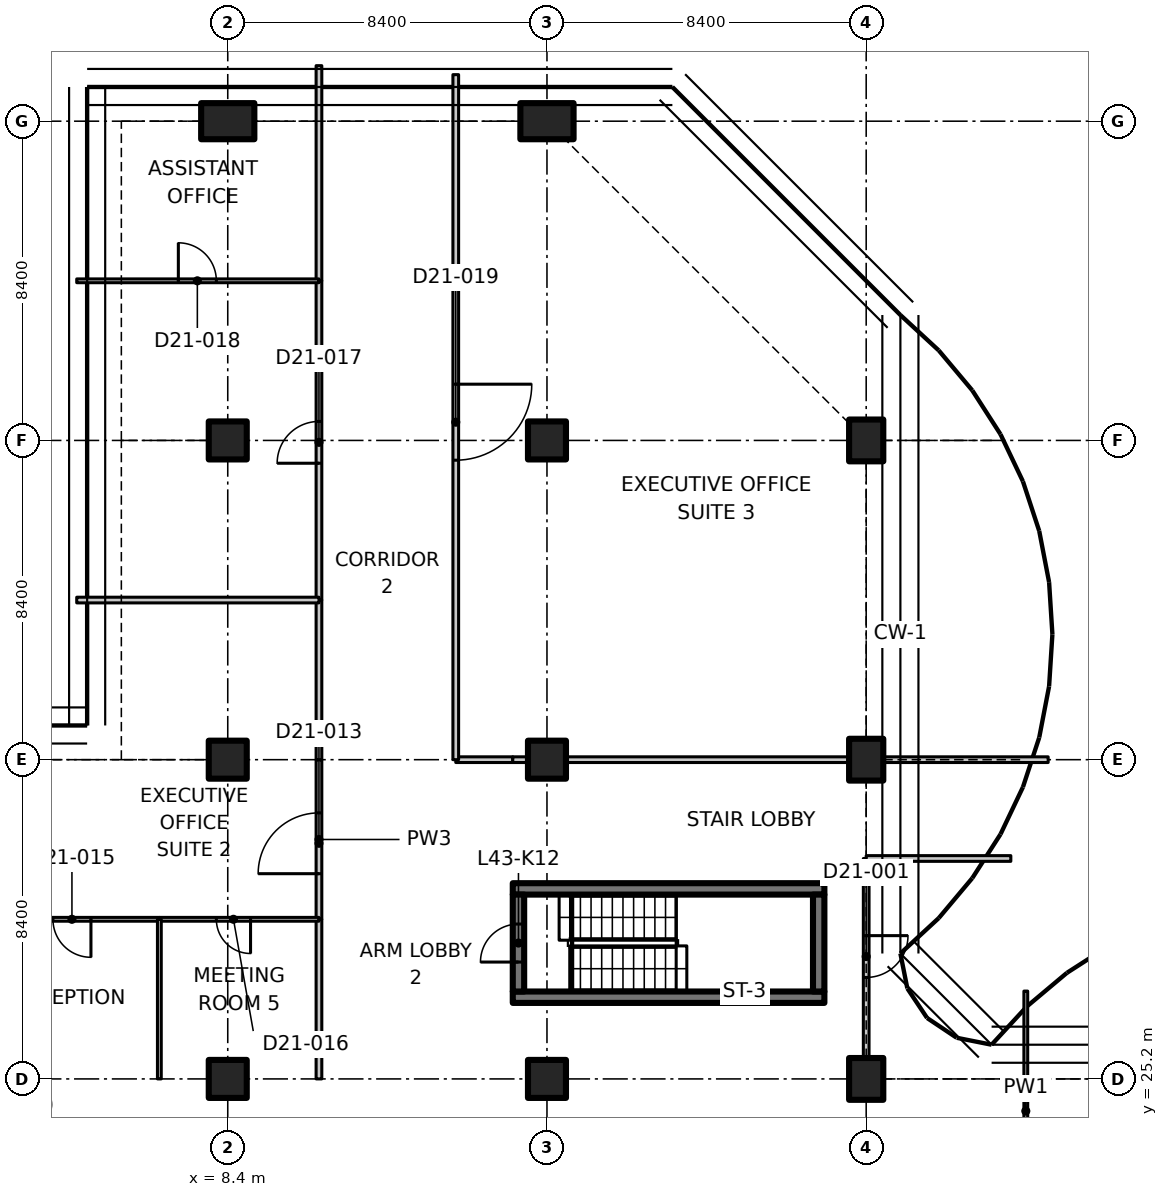
"""IFC4 building model, lengths in metres.
Left out: names, types, materials, properties, quantities, classifications, styles, units other than length and angle.
Written with IfcOpenShell. Run it as: python <this file> out.ifc"""

import sys

from ifc_helpers import new_model, si_unit, direction, frame, frame_2d, origin, origin_2d, place, context, subcontext, project, spatial, polyline, rectangle, outline, extrude, element, fill, save


model = new_model("IFC4")
c1 = context("Model", 3, precision=1e-05, world=origin(), true_north=direction((0.0, 1.0)))
c2 = subcontext(c1, "Body", "Model", "MODEL_VIEW")
j1 = project(units=[si_unit("LENGTHUNIT", "METRE"), si_unit("PLANEANGLEUNIT", "RADIAN")], contexts=[c1])
p1 = place(None, origin())
s1 = spatial("IfcSite", under=j1, at=p1, CompositionType="ELEMENT")
p2 = place(p1, origin())
s2 = spatial("IfcBuilding", under=s1, at=p2, CompositionType="ELEMENT")
p3 = place(p2, frame((0.0, 0.0, 174.0)))
s3 = spatial("IfcBuildingStorey", under=s2, at=p3, CompositionType="ELEMENT", Elevation=174.0)
for number, where, z_axis, x_axis in (
    (1, (8.4, 25.2, 0.0), (0.0, 0.0, 1.0), (1.0, 0.0, 0.0)),
    (2, (8.4, 33.6, 0.0), (0.0, 0.0, 1.0), (1.0, 0.0, 0.0)),
    (3, (8.4, 42.0, 0.0), (0.0, 0.0, 1.0), (1.0, 0.0, 0.0)),
):
    element("IfcColumn", number, at=place(p3, frame(where, z_axis=z_axis, x_axis=x_axis)), inside=s3, PredefinedType="COLUMN", context=c2, shape_type="SweptSolid", body=[
        extrude(rectangle(XDim=1.0, YDim=1.0, at=origin_2d()), origin(), (0.0, 0.0, 1.0), 3.35),
    ])
p4 = place(p3, frame((8.4, 50.4, 0.0), z_axis=(0.0, 0.0, 1.0), x_axis=(0.0, 1.0, 0.0)))
e4 = element("IfcColumn", 4, at=p4, inside=s3, PredefinedType="COLUMN", context=c2, shape_type="SweptSolid", body=[
    extrude(rectangle(XDim=0.95, YDim=1.4, at=origin_2d()), origin(), (0.0, 0.0, 1.0), 3.35),
])
for number, where, z_axis, x_axis in (
    (5, (16.8, 25.2, 0.0), (0.0, 0.0, 1.0), (1.0, 0.0, 0.0)),
    (6, (16.8, 33.6, 0.0), (0.0, 0.0, 1.0), (1.0, 0.0, 0.0)),
    (7, (16.8, 42.0, 0.0), (0.0, 0.0, 1.0), (1.0, 0.0, 0.0)),
):
    element("IfcColumn", number, at=place(p3, frame(where, z_axis=z_axis, x_axis=x_axis)), inside=s3, PredefinedType="COLUMN", context=c2, shape_type="SweptSolid", body=[
        extrude(rectangle(XDim=1.0, YDim=1.0, at=origin_2d()), origin(), (0.0, 0.0, 1.0), 3.35),
    ])
p5 = place(p3, frame((16.8, 50.4, 0.0), z_axis=(0.0, 0.0, 1.0), x_axis=(0.0, 1.0, 0.0)))
e8 = element("IfcColumn", 8, at=p5, inside=s3, PredefinedType="COLUMN", context=c2, shape_type="SweptSolid", body=[
    extrude(rectangle(XDim=0.95, YDim=1.4, at=origin_2d()), origin(), (0.0, 0.0, 1.0), 3.35),
])
for number, where, z_axis, x_axis in (
    (9, (25.2, 25.2, 0.0), (0.0, 0.0, 1.0), (1.0, 0.0, 0.0)),
    (10, (25.2, 33.6, 0.0), (0.0, 0.0, 1.0), (1.0, 0.0, 0.0)),
    (11, (25.2, 42.0, 0.0), (0.0, 0.0, 1.0), (1.0, 0.0, 0.0)),
):
    element("IfcColumn", number, at=place(p3, frame(where, z_axis=z_axis, x_axis=x_axis)), inside=s3, PredefinedType="COLUMN", context=c2, shape_type="SweptSolid", body=[
        extrude(rectangle(XDim=0.9, YDim=1.1, at=origin_2d()), origin(), (0.0, 0.0, 1.0), 3.35),
    ])
for number, where, z_axis, x_axis in (
    (12, (15.9, 27.35, 0.0), (0.0, 0.0, 1.0), (1.0, 0.0, 0.0)),
    (13, (15.9, 30.2, 0.0), (0.0, 0.0, 1.0), (1.0, 0.0, 0.0)),
):
    element("IfcWall", number, at=place(p3, frame(where, z_axis=z_axis, x_axis=x_axis)), inside=s3, PredefinedType="SHEAR", context=c2, shape_type="SweptSolid", body=[
        extrude(rectangle(XDim=8.2, YDim=0.3, at=frame_2d((4.1, 0.0))), origin(), (0.0, 0.0, 1.0), 3.35),
    ])
p6 = place(p3, frame((16.05, 27.5, 0.0), z_axis=(0.0, 0.0, 1.0), x_axis=(0.0, 1.0, 0.0)))
e14 = element("IfcWall", 14, at=p6, inside=s3, PredefinedType="SHEAR", context=c2, shape_type="SweptSolid", body=[
    extrude(rectangle(XDim=2.55, YDim=0.3, at=frame_2d((1.275, 0.0))), origin(), (0.0, 0.0, 1.0), 3.35),
])
p7 = place(p6, frame((0.775, 0.0, 0.0)))
e15 = element("IfcOpeningElement", 15, at=p7, cuts=e14, PredefinedType="OPENING", context=c2, shape_type="SweptSolid", body=[
    extrude(rectangle(XDim=1.0, YDim=2.1, at=frame_2d((0.5, 1.05))), frame((0.0, 0.16, 0.0), z_axis=(0.0, -1.0, 0.0), x_axis=(1.0, 0.0, 0.0)), (0.0, 0.0, 1.0), 0.32),
])
p8 = place(p3, frame((23.95, 27.5, 0.0), z_axis=(0.0, 0.0, 1.0), x_axis=(0.0, 1.0, 0.0)))
e16 = element("IfcWall", 16, at=p8, inside=s3, PredefinedType="SHEAR", context=c2, shape_type="SweptSolid", body=[
    extrude(rectangle(XDim=2.55, YDim=0.3, at=frame_2d((1.275, 0.0))), origin(), (0.0, 0.0, 1.0), 3.35),
])
p9 = place(p3, frame((29.4, 27.511, 0.0), z_axis=(0.0, 0.0, 1.0), x_axis=(0.0, -1.0, 0.0)))
e17 = element("IfcWall", 17, at=p9, inside=s3, PredefinedType="PARTITIONING", context=c2, shape_type="SweptSolid", body=[
    extrude(outline(polyline([(0.0, 0.0), (6.311, 0.0), (6.311, 3.33), (2.761, 3.33), (2.759, 2.98), (1.863, 2.98), (1.861, 3.33), (0.236, 3.33), (0.0, 3.33), (0.0, 0.0)])), frame((0.0, 0.05, 0.0), z_axis=(0.0, -1.0, 0.0), x_axis=(1.0, 0.0, 0.0)), (0.0, 0.0, 1.0), 0.1),
])
p10 = place(p3, frame((25.2, 31.0, 0.0), z_axis=(0.0, 0.0, 1.0), x_axis=(0.0, -1.0, 0.0)))
e18 = element("IfcWall", 18, at=p10, inside=s3, PredefinedType="PARTITIONING", context=c2, shape_type="SweptSolid", body=[
    extrude(outline(polyline([(0.0, 0.0), (5.23, 0.0), (5.23, 2.98), (0.0, 2.98), (0.0, 0.0)])), frame((0.0, 0.075, 0.0), z_axis=(0.0, -1.0, 0.0), x_axis=(1.0, 0.0, 0.0)), (0.0, 0.0, 1.0), 0.15),
])
p11 = place(p10, frame((2.03, 0.0, 0.0)))
e19 = element("IfcOpeningElement", 19, at=p11, cuts=e18, PredefinedType="OPENING", context=c2, shape_type="SweptSolid", body=[
    extrude(rectangle(XDim=1.1, YDim=2.1, at=frame_2d((0.55, 1.05))), frame((0.0, 0.085, 0.0), z_axis=(0.0, -1.0, 0.0), x_axis=(1.0, 0.0, 0.0)), (0.0, 0.0, 1.0), 0.17),
])
p12 = place(p3, frame((25.2, 31.0, 0.0), z_axis=(0.0, 0.0, 1.0), x_axis=(1.0, 0.0, 0.0)))
e20 = element("IfcWall", 20, at=p12, inside=s3, PredefinedType="PARTITIONING", context=c2, shape_type="SweptSolid", body=[
    extrude(rectangle(XDim=3.806, YDim=0.15, at=frame_2d((1.903, 0.0))), origin(), (0.0, 0.0, 1.0), 2.98),
])
p13 = place(p3, frame((10.8, 29.4, 0.0), z_axis=(0.0, 0.0, 1.0), x_axis=(0.0, 1.0, 0.0)))
e21 = element("IfcWall", 21, at=p13, inside=s3, PredefinedType="PARTITIONING", context=c2, shape_type="SweptSolid", body=[
    extrude(rectangle(XDim=4.2, YDim=0.15, at=frame_2d((2.1, 0.0))), origin(), (0.0, 0.0, 1.0), 3.33),
])
p14 = place(p13, frame((1.2, 0.0, 0.0)))
e22 = element("IfcOpeningElement", 22, at=p14, cuts=e21, PredefinedType="OPENING", context=c2, shape_type="SweptSolid", body=[
    extrude(rectangle(XDim=1.6, YDim=2.1, at=frame_2d((0.8, 1.05))), frame((0.0, 0.085, 0.0), z_axis=(0.0, -1.0, 0.0), x_axis=(1.0, 0.0, 0.0)), (0.0, 0.0, 1.0), 0.17),
])
p15 = place(p3, frame((10.8, 25.2, 0.0), z_axis=(0.0, 0.0, 1.0), x_axis=(0.0, 1.0, 0.0)))
e23 = element("IfcWall", 23, at=p15, inside=s3, PredefinedType="PARTITIONING", context=c2, shape_type="SweptSolid", body=[
    extrude(rectangle(XDim=4.2, YDim=0.15, at=frame_2d((2.1, 0.0))), origin(), (0.0, 0.0, 1.0), 3.33),
])
p16 = place(p3, frame((14.4, 33.6, 0.0), z_axis=(0.0, 0.0, 1.0), x_axis=(1.0, 0.0, 0.0)))
e24 = element("IfcWall", 24, at=p16, inside=s3, PredefinedType="PARTITIONING", context=c2, shape_type="SweptSolid", body=[
    extrude(rectangle(XDim=1.5, YDim=0.15, at=frame_2d((0.75, 0.0))), origin(), (0.0, 0.0, 1.0), 3.33),
])
p17 = place(p3, frame((15.9, 33.6, 0.0), z_axis=(0.0, 0.0, 1.0), x_axis=(1.0, 0.0, 0.0)))
e25 = element("IfcWall", 25, at=p17, inside=s3, PredefinedType="PARTITIONING", context=c2, shape_type="SweptSolid", body=[
    extrude(rectangle(XDim=0.38, YDim=0.15, at=frame_2d((0.19, 0.0))), origin(), (0.0, 0.0, 1.0), 3.33),
])
p18 = place(p3, frame((17.32, 33.6, 0.0), z_axis=(0.0, 0.0, 1.0), x_axis=(1.0, 0.0, 0.0)))
e26 = element("IfcWall", 26, at=p18, inside=s3, PredefinedType="PARTITIONING", context=c2, shape_type="SweptSolid", body=[
    extrude(rectangle(XDim=7.41, YDim=0.15, at=frame_2d((3.705, 0.0))), origin(), (0.0, 0.0, 1.0), 3.33),
])
p19 = place(p3, frame((25.67, 33.6, 0.0), z_axis=(0.0, 0.0, 1.0), x_axis=(1.0, 0.0, 0.0)))
e27 = element("IfcWall", 27, at=p19, inside=s3, PredefinedType="PARTITIONING", context=c2, shape_type="SweptSolid", body=[
    extrude(rectangle(XDim=4.318, YDim=0.15, at=frame_2d((2.159, 0.0))), origin(), (0.0, 0.0, 1.0), 2.98),
])
p20 = place(p3, frame((10.8, 33.6, 0.0), z_axis=(0.0, 0.0, 1.0), x_axis=(0.0, 1.0, 0.0)))
e28 = element("IfcWall", 28, at=p20, inside=s3, PredefinedType="PARTITIONING", context=c2, shape_type="SweptSolid", body=[
    extrude(rectangle(XDim=4.2, YDim=0.15, at=frame_2d((2.1, 0.0))), origin(), (0.0, 0.0, 1.0), 3.33),
])
p21 = place(p3, frame((10.8, 37.8, 0.0), z_axis=(0.0, 0.0, 1.0), x_axis=(0.0, 1.0, 0.0)))
e29 = element("IfcWall", 29, at=p21, inside=s3, PredefinedType="PARTITIONING", context=c2, shape_type="SweptSolid", body=[
    extrude(rectangle(XDim=8.4, YDim=0.15, at=frame_2d((4.2, 0.0))), origin(), (0.0, 0.0, 1.0), 3.33),
])
p22 = place(p21, frame((3.6, 0.0, 0.0)))
e30 = element("IfcOpeningElement", 30, at=p22, cuts=e29, PredefinedType="OPENING", context=c2, shape_type="SweptSolid", body=[
    extrude(rectangle(XDim=1.1, YDim=2.1, at=frame_2d((0.55, 1.05))), frame((0.0, 0.085, 0.0), z_axis=(0.0, -1.0, 0.0), x_axis=(1.0, 0.0, 0.0)), (0.0, 0.0, 1.0), 0.17),
])
p23 = place(p3, frame((10.8, 46.2, 0.0), z_axis=(0.0, 0.0, 1.0), x_axis=(0.0, 1.0, 0.0)))
e31 = element("IfcWall", 31, at=p23, inside=s3, PredefinedType="PARTITIONING", context=c2, shape_type="SweptSolid", body=[
    extrude(outline(polyline([(0.0, 0.0), (5.661, 0.0), (5.661, 3.33), (5.28, 3.33), (4.65, 3.33), (4.648, 2.98), (3.752, 2.98), (3.75, 3.33), (0.0, 3.33), (0.0, 0.0)])), frame((0.0, 0.075, 0.0), z_axis=(0.0, -1.0, 0.0), x_axis=(1.0, 0.0, 0.0)), (0.0, 0.0, 1.0), 0.15),
])
p24 = place(p3, frame((14.4, 51.625, 0.0), z_axis=(0.0, 0.0, 1.0), x_axis=(0.0, -1.0, 0.0)))
e32 = element("IfcWall", 32, at=p24, inside=s3, PredefinedType="PARTITIONING", context=c2, shape_type="SweptSolid", body=[
    extrude(outline(polyline([(0.0, 0.0), (18.025, 0.0), (18.025, 3.33), (1.675, 3.33), (1.673, 2.98), (0.777, 2.98), (0.775, 3.33), (0.145, 3.33), (0.0, 3.33), (0.0, 0.0)])), frame((0.0, 0.075, 0.0), z_axis=(0.0, -1.0, 0.0), x_axis=(1.0, 0.0, 0.0)), (0.0, 0.0, 1.0), 0.15),
])
p25 = place(p24, frame((8.145, 0.0, 0.0)))
e33 = element("IfcOpeningElement", 33, at=p25, cuts=e32, PredefinedType="OPENING", context=c2, shape_type="SweptSolid", body=[
    extrude(rectangle(XDim=2.0, YDim=2.4, at=frame_2d((1.0, 1.2))), frame((0.0, 0.085, 0.0), z_axis=(0.0, -1.0, 0.0), x_axis=(1.0, 0.0, 0.0)), (0.0, 0.0, 1.0), 0.17),
])
p26 = place(p3, frame((6.6, 29.4, 0.0), z_axis=(0.0, 0.0, 1.0), x_axis=(-1.0, 0.0, 0.0)))
e34 = element("IfcWall", 34, at=p26, inside=s3, PredefinedType="PARTITIONING", context=c2, shape_type="SweptSolid", body=[
    extrude(rectangle(XDim=4.8, YDim=0.1, at=frame_2d((2.4, 0.0))), origin(), (0.0, 0.0, 1.0), 3.33),
])
p27 = place(p26, frame((1.8, 0.0, 0.0)))
e35 = element("IfcOpeningElement", 35, at=p27, cuts=e34, PredefinedType="OPENING", context=c2, shape_type="SweptSolid", body=[
    extrude(rectangle(XDim=1.0, YDim=2.1, at=frame_2d((0.5, 1.05))), frame((0.0, 0.06, 0.0), z_axis=(0.0, -1.0, 0.0), x_axis=(1.0, 0.0, 0.0)), (0.0, 0.0, 1.0), 0.12),
])
p28 = place(p3, frame((10.8, 29.4, 0.0), z_axis=(0.0, 0.0, 1.0), x_axis=(-1.0, 0.0, 0.0)))
e36 = element("IfcWall", 36, at=p28, inside=s3, PredefinedType="PARTITIONING", context=c2, shape_type="SweptSolid", body=[
    extrude(rectangle(XDim=4.2, YDim=0.1, at=frame_2d((2.1, 0.0))), origin(), (0.0, 0.0, 1.0), 3.33),
])
p29 = place(p28, frame((1.8, 0.0, 0.0)))
e37 = element("IfcOpeningElement", 37, at=p29, cuts=e36, PredefinedType="OPENING", context=c2, shape_type="SweptSolid", body=[
    extrude(rectangle(XDim=0.9, YDim=2.1, at=frame_2d((0.45, 1.05))), frame((0.0, 0.06, 0.0), z_axis=(0.0, -1.0, 0.0), x_axis=(1.0, 0.0, 0.0)), (0.0, 0.0, 1.0), 0.12),
])
p30 = place(p3, frame((4.426, 37.8, 0.0), z_axis=(0.0, 0.0, 1.0), x_axis=(1.0, 0.0, 0.0)))
e38 = element("IfcWall", 38, at=p30, inside=s3, PredefinedType="PARTITIONING", context=c2, shape_type="SweptSolid", body=[
    extrude(outline(polyline([(0.0, 0.0), (6.374, 0.0), (6.374, 3.33), (1.624, 3.33), (1.622, 2.98), (0.726, 2.98), (0.724, 3.33), (0.074, 3.33), (0.0, 3.33), (0.0, 0.0)])), frame((0.0, 0.075, 0.0), z_axis=(0.0, -1.0, 0.0), x_axis=(1.0, 0.0, 0.0)), (0.0, 0.0, 1.0), 0.15),
])
p31 = place(p3, frame((6.6, 29.4, 0.0), z_axis=(0.0, 0.0, 1.0), x_axis=(0.0, -1.0, 0.0)))
e39 = element("IfcWall", 39, at=p31, inside=s3, PredefinedType="PARTITIONING", context=c2, shape_type="SweptSolid", body=[
    extrude(rectangle(XDim=4.2, YDim=0.1, at=frame_2d((2.1, 0.0))), origin(), (0.0, 0.0, 1.0), 3.33),
])
p32 = place(p3, frame((4.426, 46.2, 0.0), z_axis=(0.0, 0.0, 1.0), x_axis=(1.0, 0.0, 0.0)))
e40 = element("IfcWall", 40, at=p32, inside=s3, PredefinedType="PARTITIONING", context=c2, shape_type="SweptSolid", body=[
    extrude(outline(polyline([(0.0, 0.0), (6.374, 0.0), (6.374, 3.33), (1.624, 3.33), (1.622, 2.98), (0.726, 2.98), (0.724, 3.33), (0.074, 3.33), (0.0, 3.33), (0.0, 0.0)])), frame((0.0, 0.05, 0.0), z_axis=(0.0, -1.0, 0.0), x_axis=(1.0, 0.0, 0.0)), (0.0, 0.0, 1.0), 0.1),
])
p33 = place(p32, frame((2.674, 0.0, 0.0)))
e41 = element("IfcOpeningElement", 41, at=p33, cuts=e40, PredefinedType="OPENING", context=c2, shape_type="SweptSolid", body=[
    extrude(rectangle(XDim=1.0, YDim=2.1, at=frame_2d((0.5, 1.05))), frame((0.0, 0.06, 0.0), z_axis=(0.0, -1.0, 0.0), x_axis=(1.0, 0.0, 0.0)), (0.0, 0.0, 1.0), 0.12),
])
p34 = place(p7, origin())
e42 = element("IfcDoor", 42, at=p34, inside=s3, OperationType="SINGLE_SWING_RIGHT", PredefinedType="DOOR", context=c2, shape_type="SweptSolid", body=[
    extrude(rectangle(XDim=1.0, YDim=2.1, at=frame_2d((0.5, 1.05))), frame((0.0, 0.025, 0.0), z_axis=(0.0, -1.0, 0.0), x_axis=(1.0, 0.0, 0.0)), (0.0, 0.0, 1.0), 0.05),
])
fill(e15, e42)
p35 = place(p11, origin())
e43 = element("IfcDoor", 43, at=p35, inside=s3, OperationType="SINGLE_SWING_RIGHT", PredefinedType="DOOR", context=c2, shape_type="SweptSolid", body=[
    extrude(rectangle(XDim=1.1, YDim=2.1, at=frame_2d((0.55, 1.05))), frame((0.0, 0.025, 0.0), z_axis=(0.0, -1.0, 0.0), x_axis=(1.0, 0.0, 0.0)), (0.0, 0.0, 1.0), 0.05),
])
fill(e19, e43)
p36 = place(p14, origin())
e44 = element("IfcDoor", 44, at=p36, inside=s3, OperationType="DOUBLE_DOOR_SINGLE_SWING", PredefinedType="DOOR", context=c2, shape_type="SweptSolid", body=[
    extrude(rectangle(XDim=1.6, YDim=2.1, at=frame_2d((0.8, 1.05))), frame((0.0, 0.025, 0.0), z_axis=(0.0, -1.0, 0.0), x_axis=(1.0, 0.0, 0.0)), (0.0, 0.0, 1.0), 0.05),
])
fill(e22, e44)
p37 = place(p27, origin())
e45 = element("IfcDoor", 45, at=p37, inside=s3, OperationType="SINGLE_SWING_LEFT", PredefinedType="DOOR", context=c2, shape_type="SweptSolid", body=[
    extrude(rectangle(XDim=1.0, YDim=2.1, at=frame_2d((0.5, 1.05))), frame((0.0, 0.025, 0.0), z_axis=(0.0, -1.0, 0.0), x_axis=(1.0, 0.0, 0.0)), (0.0, 0.0, 1.0), 0.05),
])
fill(e35, e45)
p38 = place(p29, origin())
e46 = element("IfcDoor", 46, at=p38, inside=s3, OperationType="SINGLE_SWING_LEFT", PredefinedType="DOOR", context=c2, shape_type="SweptSolid", body=[
    extrude(rectangle(XDim=0.9, YDim=2.1, at=frame_2d((0.45, 1.05))), frame((0.0, 0.025, 0.0), z_axis=(0.0, -1.0, 0.0), x_axis=(1.0, 0.0, 0.0)), (0.0, 0.0, 1.0), 0.05),
])
fill(e37, e46)
p39 = place(p22, origin())
e47 = element("IfcDoor", 47, at=p39, inside=s3, OperationType="SINGLE_SWING_LEFT", PredefinedType="DOOR", context=c2, shape_type="SweptSolid", body=[
    extrude(rectangle(XDim=1.1, YDim=2.1, at=frame_2d((0.55, 1.05))), frame((0.0, 0.025, 0.0), z_axis=(0.0, -1.0, 0.0), x_axis=(1.0, 0.0, 0.0)), (0.0, 0.0, 1.0), 0.05),
])
fill(e30, e47)
p40 = place(p33, origin())
e48 = element("IfcDoor", 48, at=p40, inside=s3, OperationType="SINGLE_SWING_LEFT", PredefinedType="DOOR", context=c2, shape_type="SweptSolid", body=[
    extrude(rectangle(XDim=1.0, YDim=2.1, at=frame_2d((0.5, 1.05))), frame((0.0, 0.025, 0.0), z_axis=(0.0, -1.0, 0.0), x_axis=(1.0, 0.0, 0.0)), (0.0, 0.0, 1.0), 0.05),
])
fill(e41, e48)
p41 = place(p25, origin())
e49 = element("IfcDoor", 49, at=p41, inside=s3, OperationType="DOUBLE_DOOR_SINGLE_SWING", PredefinedType="DOOR", context=c2, shape_type="SweptSolid", body=[
    extrude(rectangle(XDim=2.0, YDim=2.4, at=frame_2d((1.0, 1.2))), frame((0.0, 0.025, 0.0), z_axis=(0.0, -1.0, 0.0), x_axis=(1.0, 0.0, 0.0)), (0.0, 0.0, 1.0), 0.05),
])
fill(e33, e49)
save(model, sys.argv[1])
